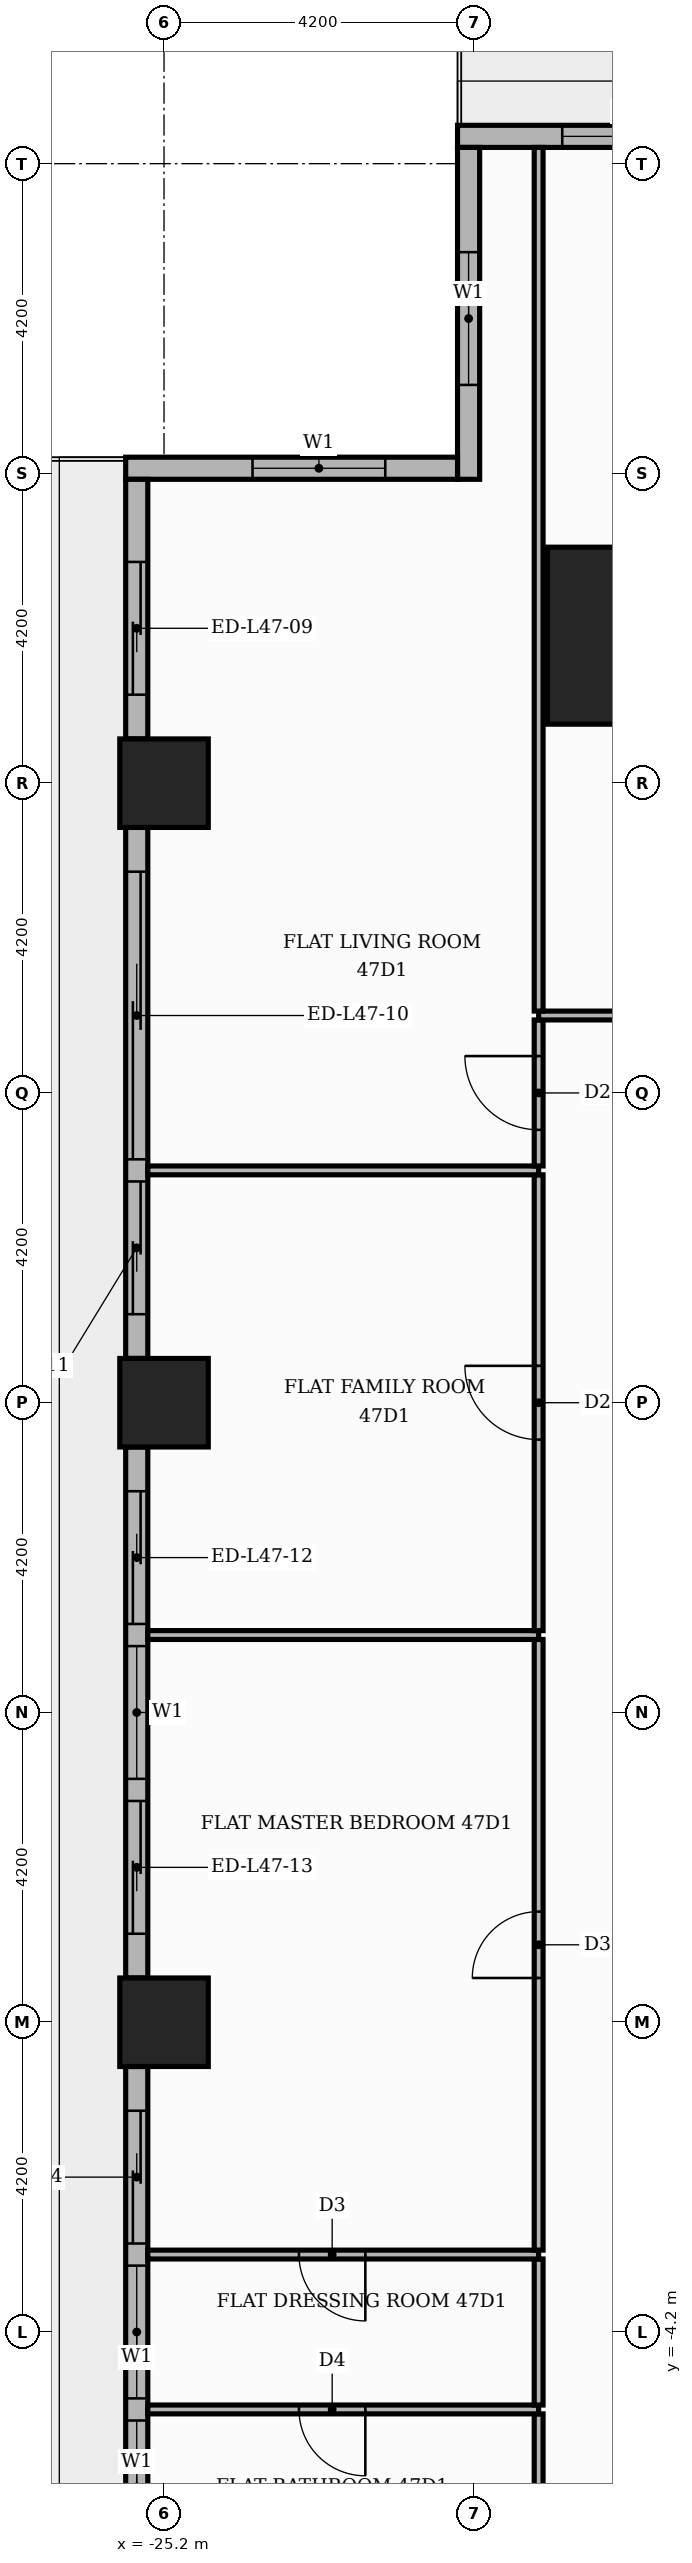
"""IFC4 building model, lengths in metres.
Left out: names, types, materials, properties, quantities, classifications, styles, units other than length and angle.
Written with IfcOpenShell. Run it as: python <this file> out.ifc"""

import sys

from ifc_helpers import new_model, si_unit, direction, frame, frame_2d, origin, origin_2d, place, context, subcontext, project, spatial, rectangle, extrude, element, fill, save


model = new_model("IFC4")
c1 = context("Model", 3, precision=1e-05, world=origin(), true_north=direction((0.0, 1.0)))
c2 = subcontext(c1, "Body", "Model", "MODEL_VIEW")
j1 = project(units=[si_unit("LENGTHUNIT", "METRE"), si_unit("PLANEANGLEUNIT", "RADIAN")], contexts=[c1])
p1 = place(None, origin())
s1 = spatial("IfcSite", under=j1, at=p1, CompositionType="ELEMENT")
p2 = place(p1, origin())
s2 = spatial("IfcBuilding", under=s1, at=p2, CompositionType="ELEMENT")
p3 = place(p2, frame((0.0, 0.0, 200.1)))
s3 = spatial("IfcBuildingStorey", under=s2, at=p3, CompositionType="ELEMENT", Elevation=200.1)
p4 = place(p3, frame((-18.8, 18.8, 0.0), z_axis=(0.0, 0.0, 1.0), x_axis=(1.0, 0.0, 0.0)))
e1 = element("IfcColumn", 1, at=p4, inside=s3, PredefinedType="COLUMN", context=c2, shape_type="SweptSolid", body=[
    extrude(rectangle(XDim=2.4, YDim=2.4, at=origin_2d()), origin(), (0.0, 0.0, 1.0), 3.9),
])
for number, where, z_axis, x_axis in (
    (2, (-25.2, 0.0, 0.0), (0.0, 0.0, 1.0), (1.0, 0.0, 0.0)),
    (3, (-25.2, 8.4, 0.0), (0.0, 0.0, 1.0), (1.0, 0.0, 0.0)),
    (4, (-25.2, 16.8, 0.0), (0.0, 0.0, 1.0), (1.0, 0.0, 0.0)),
):
    element("IfcColumn", number, at=place(p3, frame(where, z_axis=z_axis, x_axis=x_axis)), inside=s3, PredefinedType="COLUMN", context=c2, shape_type="SweptSolid", body=[
        extrude(rectangle(XDim=1.2, YDim=1.2, at=origin_2d()), origin(), (0.0, 0.0, 1.0), 3.9),
    ])
p5 = place(p3, frame((-17.4, 25.57, 0.0), z_axis=(0.0, 0.0, 1.0), x_axis=(-1.0, 0.0, 0.0)))
e5 = element("IfcWall", 5, at=p5, inside=s3, PredefinedType="STANDARD", context=c2, shape_type="SweptSolid", body=[
    extrude(rectangle(XDim=3.82, YDim=0.3, at=frame_2d((1.91, 0.0))), origin(), (0.0, 0.0, 1.0), 3.48),
])
p6 = place(p5, frame((0.6, 0.0, 0.9)))
e6 = element("IfcOpeningElement", 6, at=p6, cuts=e5, PredefinedType="OPENING", context=c2, shape_type="SweptSolid", body=[
    extrude(rectangle(XDim=1.8, YDim=2.1, at=frame_2d((0.9, 1.05))), frame((0.0, 0.16, 0.0), z_axis=(0.0, -1.0, 0.0), x_axis=(1.0, 0.0, 0.0)), (0.0, 0.0, 1.0), 0.32),
])
p7 = place(p3, frame((-21.07, 25.42, 0.0), z_axis=(0.0, 0.0, 1.0), x_axis=(0.0, -1.0, 0.0)))
e7 = element("IfcWall", 7, at=p7, inside=s3, PredefinedType="STANDARD", context=c2, shape_type="SweptSolid", body=[
    extrude(rectangle(XDim=4.5, YDim=0.3, at=frame_2d((2.25, 0.0))), origin(), (0.0, 0.0, 1.0), 3.48),
])
p8 = place(p7, frame((1.42, 0.0, 0.9)))
e8 = element("IfcOpeningElement", 8, at=p8, cuts=e7, PredefinedType="OPENING", context=c2, shape_type="SweptSolid", body=[
    extrude(rectangle(XDim=1.8, YDim=2.1, at=frame_2d((0.9, 1.05))), frame((0.0, 0.16, 0.0), z_axis=(0.0, -1.0, 0.0), x_axis=(1.0, 0.0, 0.0)), (0.0, 0.0, 1.0), 0.32),
])
p9 = place(p3, frame((-21.22, 21.07, 0.0), z_axis=(0.0, 0.0, 1.0), x_axis=(-1.0, 0.0, 0.0)))
e9 = element("IfcWall", 9, at=p9, inside=s3, PredefinedType="STANDARD", context=c2, shape_type="SweptSolid", body=[
    extrude(rectangle(XDim=4.5, YDim=0.3, at=frame_2d((2.25, 0.0))), origin(), (0.0, 0.0, 1.0), 3.48),
])
p10 = place(p9, frame((0.98, 0.0, 0.9)))
e10 = element("IfcOpeningElement", 10, at=p10, cuts=e9, PredefinedType="OPENING", context=c2, shape_type="SweptSolid", body=[
    extrude(rectangle(XDim=1.8, YDim=2.1, at=frame_2d((0.9, 1.05))), frame((0.0, 0.16, 0.0), z_axis=(0.0, -1.0, 0.0), x_axis=(1.0, 0.0, 0.0)), (0.0, 0.0, 1.0), 0.32),
])
p11 = place(p3, frame((-25.57, 20.92, 0.0), z_axis=(0.0, 0.0, 1.0), x_axis=(0.0, -1.0, 0.0)))
e11 = element("IfcWall", 11, at=p11, inside=s3, PredefinedType="STANDARD", context=c2, shape_type="SweptSolid", body=[
    extrude(rectangle(XDim=3.52, YDim=0.3, at=frame_2d((1.76, 0.0))), origin(), (0.0, 0.0, 1.0), 3.48),
])
p12 = place(p11, frame((1.12, 0.0, 0.0)))
e12 = element("IfcOpeningElement", 12, at=p12, cuts=e11, PredefinedType="OPENING", context=c2, shape_type="SweptSolid", body=[
    extrude(rectangle(XDim=1.8, YDim=2.4, at=frame_2d((0.9, 1.2))), frame((0.0, 0.16, 0.0), z_axis=(0.0, -1.0, 0.0), x_axis=(1.0, 0.0, 0.0)), (0.0, 0.0, 1.0), 0.32),
])
p13 = place(p3, frame((-25.57, 16.2, 0.0), z_axis=(0.0, 0.0, 1.0), x_axis=(0.0, -1.0, 0.0)))
e13 = element("IfcWall", 13, at=p13, inside=s3, PredefinedType="STANDARD", context=c2, shape_type="SweptSolid", body=[
    extrude(rectangle(XDim=7.2, YDim=0.3, at=frame_2d((3.6, 0.0))), origin(), (0.0, 0.0, 1.0), 3.48),
])
p14 = place(p13, frame((0.6, 0.0, 0.0)))
e14 = element("IfcOpeningElement", 14, at=p14, cuts=e13, PredefinedType="OPENING", context=c2, shape_type="SweptSolid", body=[
    extrude(rectangle(XDim=3.9, YDim=2.4, at=frame_2d((1.95, 1.2))), frame((0.0, 0.16, 0.0), z_axis=(0.0, -1.0, 0.0), x_axis=(1.0, 0.0, 0.0)), (0.0, 0.0, 1.0), 0.32),
])
p15 = place(p13, frame((4.8, 0.0, 0.0)))
e15 = element("IfcOpeningElement", 15, at=p15, cuts=e13, PredefinedType="OPENING", context=c2, shape_type="SweptSolid", body=[
    extrude(rectangle(XDim=1.8, YDim=2.4, at=frame_2d((0.9, 1.2))), frame((0.0, 0.16, 0.0), z_axis=(0.0, -1.0, 0.0), x_axis=(1.0, 0.0, 0.0)), (0.0, 0.0, 1.0), 0.32),
])
p16 = place(p3, frame((-25.57, 7.8, 0.0), z_axis=(0.0, 0.0, 1.0), x_axis=(0.0, -1.0, 0.0)))
e16 = element("IfcWall", 16, at=p16, inside=s3, PredefinedType="STANDARD", context=c2, shape_type="SweptSolid", body=[
    extrude(rectangle(XDim=7.2, YDim=0.3, at=frame_2d((3.6, 0.0))), origin(), (0.0, 0.0, 1.0), 3.48),
])
p17 = place(p16, frame((0.6, 0.0, 0.0)))
e17 = element("IfcOpeningElement", 17, at=p17, cuts=e16, PredefinedType="OPENING", context=c2, shape_type="SweptSolid", body=[
    extrude(rectangle(XDim=1.8, YDim=2.4, at=frame_2d((0.9, 1.2))), frame((0.0, 0.16, 0.0), z_axis=(0.0, -1.0, 0.0), x_axis=(1.0, 0.0, 0.0)), (0.0, 0.0, 1.0), 0.32),
])
p18 = place(p16, frame((2.7, 0.0, 0.9)))
e18 = element("IfcOpeningElement", 18, at=p18, cuts=e16, PredefinedType="OPENING", context=c2, shape_type="SweptSolid", body=[
    extrude(rectangle(XDim=1.8, YDim=2.1, at=frame_2d((0.9, 1.05))), frame((0.0, 0.16, 0.0), z_axis=(0.0, -1.0, 0.0), x_axis=(1.0, 0.0, 0.0)), (0.0, 0.0, 1.0), 0.32),
])
p19 = place(p16, frame((4.8, 0.0, 0.0)))
e19 = element("IfcOpeningElement", 19, at=p19, cuts=e16, PredefinedType="OPENING", context=c2, shape_type="SweptSolid", body=[
    extrude(rectangle(XDim=1.8, YDim=2.4, at=frame_2d((0.9, 1.2))), frame((0.0, 0.16, 0.0), z_axis=(0.0, -1.0, 0.0), x_axis=(1.0, 0.0, 0.0)), (0.0, 0.0, 1.0), 0.32),
])
p20 = place(p3, frame((-25.57, -0.6, 0.0), z_axis=(0.0, 0.0, 1.0), x_axis=(0.0, -1.0, 0.0)))
e20 = element("IfcWall", 20, at=p20, inside=s3, PredefinedType="STANDARD", context=c2, shape_type="SweptSolid", body=[
    extrude(rectangle(XDim=7.2, YDim=0.3, at=frame_2d((3.6, 0.0))), origin(), (0.0, 0.0, 1.0), 3.48),
])
p21 = place(p20, frame((0.6, 0.0, 0.0)))
e21 = element("IfcOpeningElement", 21, at=p21, cuts=e20, PredefinedType="OPENING", context=c2, shape_type="SweptSolid", body=[
    extrude(rectangle(XDim=1.8, YDim=2.4, at=frame_2d((0.9, 1.2))), frame((0.0, 0.16, 0.0), z_axis=(0.0, -1.0, 0.0), x_axis=(1.0, 0.0, 0.0)), (0.0, 0.0, 1.0), 0.32),
])
p22 = place(p20, frame((2.7, 0.0, 0.9)))
e22 = element("IfcOpeningElement", 22, at=p22, cuts=e20, PredefinedType="OPENING", context=c2, shape_type="SweptSolid", body=[
    extrude(rectangle(XDim=1.8, YDim=2.1, at=frame_2d((0.9, 1.05))), frame((0.0, 0.16, 0.0), z_axis=(0.0, -1.0, 0.0), x_axis=(1.0, 0.0, 0.0)), (0.0, 0.0, 1.0), 0.32),
])
p23 = place(p20, frame((4.8, 0.0, 0.9)))
e23 = element("IfcOpeningElement", 23, at=p23, cuts=e20, PredefinedType="OPENING", context=c2, shape_type="SweptSolid", body=[
    extrude(rectangle(XDim=1.8, YDim=2.1, at=frame_2d((0.9, 1.05))), frame((0.0, 0.16, 0.0), z_axis=(0.0, -1.0, 0.0), x_axis=(1.0, 0.0, 0.0)), (0.0, 0.0, 1.0), 0.32),
])
p24 = place(p3, frame((-20.12, -7.29, 0.0), z_axis=(0.0, 0.0, 1.0), x_axis=(0.0, 1.0, 0.0)))
e24 = element("IfcWall", 24, at=p24, inside=s3, PredefinedType="PARTITIONING", context=c2, shape_type="SweptSolid", body=[
    extrude(rectangle(XDim=1.98, YDim=0.12, at=frame_2d((0.99, 0.0))), origin(), (0.0, 0.0, 1.0), 3.48),
])
p25 = place(p3, frame((-25.42, -5.25, 0.0), z_axis=(0.0, 0.0, 1.0), x_axis=(1.0, 0.0, 0.0)))
e25 = element("IfcWall", 25, at=p25, inside=s3, PredefinedType="PARTITIONING", context=c2, shape_type="SweptSolid", body=[
    extrude(rectangle(XDim=5.3, YDim=0.12, at=frame_2d((2.65, 0.0))), origin(), (0.0, 0.0, 1.0), 3.48),
])
p26 = place(p25, frame((2.05, 0.0, 0.0)))
e26 = element("IfcOpeningElement", 26, at=p26, cuts=e25, PredefinedType="OPENING", context=c2, shape_type="SweptSolid", body=[
    extrude(rectangle(XDim=0.9, YDim=2.1, at=frame_2d((0.45, 1.05))), frame((0.0, 0.07, 0.0), z_axis=(0.0, -1.0, 0.0), x_axis=(1.0, 0.0, 0.0)), (0.0, 0.0, 1.0), 0.14),
])
p27 = place(p3, frame((-20.12, -5.19, 0.0), z_axis=(0.0, 0.0, 1.0), x_axis=(0.0, 1.0, 0.0)))
e27 = element("IfcWall", 27, at=p27, inside=s3, PredefinedType="PARTITIONING", context=c2, shape_type="SweptSolid", body=[
    extrude(rectangle(XDim=1.98, YDim=0.12, at=frame_2d((0.99, 0.0))), origin(), (0.0, 0.0, 1.0), 3.48),
])
p28 = place(p3, frame((-25.42, -3.15, 0.0), z_axis=(0.0, 0.0, 1.0), x_axis=(1.0, 0.0, 0.0)))
e28 = element("IfcWall", 28, at=p28, inside=s3, PredefinedType="PARTITIONING", context=c2, shape_type="SweptSolid", body=[
    extrude(rectangle(XDim=5.3, YDim=0.12, at=frame_2d((2.65, 0.0))), origin(), (0.0, 0.0, 1.0), 3.48),
])
p29 = place(p28, frame((2.05, 0.0, 0.0)))
e29 = element("IfcOpeningElement", 29, at=p29, cuts=e28, PredefinedType="OPENING", context=c2, shape_type="SweptSolid", body=[
    extrude(rectangle(XDim=0.9, YDim=2.1, at=frame_2d((0.45, 1.05))), frame((0.0, 0.07, 0.0), z_axis=(0.0, -1.0, 0.0), x_axis=(1.0, 0.0, 0.0)), (0.0, 0.0, 1.0), 0.14),
])
p30 = place(p3, frame((-20.12, -3.09, 0.0), z_axis=(0.0, 0.0, 1.0), x_axis=(0.0, 1.0, 0.0)))
e30 = element("IfcWall", 30, at=p30, inside=s3, PredefinedType="PARTITIONING", context=c2, shape_type="SweptSolid", body=[
    extrude(rectangle(XDim=8.28, YDim=0.12, at=frame_2d((4.14, 0.0))), origin(), (0.0, 0.0, 1.0), 3.48),
])
p31 = place(p30, frame((3.69, 0.0, 0.0)))
e31 = element("IfcOpeningElement", 31, at=p31, cuts=e30, PredefinedType="OPENING", context=c2, shape_type="SweptSolid", body=[
    extrude(rectangle(XDim=0.9, YDim=2.1, at=frame_2d((0.45, 1.05))), frame((0.0, 0.07, 0.0), z_axis=(0.0, -1.0, 0.0), x_axis=(1.0, 0.0, 0.0)), (0.0, 0.0, 1.0), 0.14),
])
p32 = place(p3, frame((-25.42, 5.25, 0.0), z_axis=(0.0, 0.0, 1.0), x_axis=(1.0, 0.0, 0.0)))
e32 = element("IfcWall", 32, at=p32, inside=s3, PredefinedType="PARTITIONING", context=c2, shape_type="SweptSolid", body=[
    extrude(rectangle(XDim=5.3, YDim=0.12, at=frame_2d((2.65, 0.0))), origin(), (0.0, 0.0, 1.0), 3.48),
])
p33 = place(p3, frame((-20.12, 5.31, 0.0), z_axis=(0.0, 0.0, 1.0), x_axis=(0.0, 1.0, 0.0)))
e33 = element("IfcWall", 33, at=p33, inside=s3, PredefinedType="PARTITIONING", context=c2, shape_type="SweptSolid", body=[
    extrude(rectangle(XDim=6.18, YDim=0.12, at=frame_2d((3.09, 0.0))), origin(), (0.0, 0.0, 1.0), 3.48),
])
p34 = place(p33, frame((2.59, 0.0, 0.0)))
e34 = element("IfcOpeningElement", 34, at=p34, cuts=e33, PredefinedType="OPENING", context=c2, shape_type="SweptSolid", body=[
    extrude(rectangle(XDim=1.0, YDim=2.1, at=frame_2d((0.5, 1.05))), frame((0.0, 0.07, 0.0), z_axis=(0.0, -1.0, 0.0), x_axis=(1.0, 0.0, 0.0)), (0.0, 0.0, 1.0), 0.14),
])
p35 = place(p3, frame((-25.42, 11.55, 0.0), z_axis=(0.0, 0.0, 1.0), x_axis=(1.0, 0.0, 0.0)))
e35 = element("IfcWall", 35, at=p35, inside=s3, PredefinedType="PARTITIONING", context=c2, shape_type="SweptSolid", body=[
    extrude(rectangle(XDim=5.3, YDim=0.12, at=frame_2d((2.65, 0.0))), origin(), (0.0, 0.0, 1.0), 3.48),
])
p36 = place(p3, frame((-20.12, 11.61, 0.0), z_axis=(0.0, 0.0, 1.0), x_axis=(0.0, 1.0, 0.0)))
e36 = element("IfcWall", 36, at=p36, inside=s3, PredefinedType="PARTITIONING", context=c2, shape_type="SweptSolid", body=[
    extrude(rectangle(XDim=1.98, YDim=0.12, at=frame_2d((0.99, 0.0))), origin(), (0.0, 0.0, 1.0), 3.48),
])
p37 = place(p36, frame((0.49, 0.0, 0.0)))
e37 = element("IfcOpeningElement", 37, at=p37, cuts=e36, PredefinedType="OPENING", context=c2, shape_type="SweptSolid", body=[
    extrude(rectangle(XDim=1.0, YDim=2.1, at=frame_2d((0.5, 1.05))), frame((0.0, 0.07, 0.0), z_axis=(0.0, -1.0, 0.0), x_axis=(1.0, 0.0, 0.0)), (0.0, 0.0, 1.0), 0.14),
])
p38 = place(p3, frame((-20.12, 13.65, 0.0), z_axis=(0.0, 0.0, 1.0), x_axis=(1.0, 0.0, 0.0)))
e38 = element("IfcWall", 38, at=p38, inside=s3, PredefinedType="PARTITIONING", context=c2, shape_type="SweptSolid", body=[
    extrude(rectangle(XDim=6.47, YDim=0.12, at=frame_2d((3.235, 0.0))), origin(), (0.0, 0.0, 1.0), 3.48),
])
p39 = place(p38, frame((2.785, 0.0, 0.0)))
e39 = element("IfcOpeningElement", 39, at=p39, cuts=e38, PredefinedType="OPENING", context=c2, shape_type="SweptSolid", body=[
    extrude(rectangle(XDim=0.9, YDim=2.1, at=frame_2d((0.45, 1.05))), frame((0.0, 0.07, 0.0), z_axis=(0.0, -1.0, 0.0), x_axis=(1.0, 0.0, 0.0)), (0.0, 0.0, 1.0), 0.14),
])
p40 = place(p3, frame((-20.12, 13.71, 0.0), z_axis=(0.0, 0.0, 1.0), x_axis=(0.0, 1.0, 0.0)))
e40 = element("IfcWall", 40, at=p40, inside=s3, PredefinedType="PARTITIONING", context=c2, shape_type="SweptSolid", body=[
    extrude(rectangle(XDim=11.71, YDim=0.12, at=frame_2d((5.855, 0.0))), origin(), (0.0, 0.0, 1.0), 3.48),
])
p41 = place(p6, origin())
e41 = element("IfcWindow", 41, at=p41, inside=s3, PartitioningType="SINGLE_PANEL", PredefinedType="WINDOW", context=c2, shape_type="SweptSolid", body=[
    extrude(rectangle(XDim=1.8, YDim=2.1, at=frame_2d((0.9, 1.05))), frame((0.0, 0.03, 0.0), z_axis=(0.0, -1.0, 0.0), x_axis=(1.0, 0.0, 0.0)), (0.0, 0.0, 1.0), 0.06),
])
fill(e6, e41)
p42 = place(p8, origin())
e42 = element("IfcWindow", 42, at=p42, inside=s3, PartitioningType="SINGLE_PANEL", PredefinedType="WINDOW", context=c2, shape_type="SweptSolid", body=[
    extrude(rectangle(XDim=1.8, YDim=2.1, at=frame_2d((0.9, 1.05))), frame((0.0, 0.03, 0.0), z_axis=(0.0, -1.0, 0.0), x_axis=(1.0, 0.0, 0.0)), (0.0, 0.0, 1.0), 0.06),
])
fill(e8, e42)
p43 = place(p10, origin())
e43 = element("IfcWindow", 43, at=p43, inside=s3, PartitioningType="SINGLE_PANEL", PredefinedType="WINDOW", context=c2, shape_type="SweptSolid", body=[
    extrude(rectangle(XDim=1.8, YDim=2.1, at=frame_2d((0.9, 1.05))), frame((0.0, 0.03, 0.0), z_axis=(0.0, -1.0, 0.0), x_axis=(1.0, 0.0, 0.0)), (0.0, 0.0, 1.0), 0.06),
])
fill(e10, e43)
p44 = place(p12, origin())
e44 = element("IfcDoor", 44, at=p44, inside=s3, OperationType="SLIDING_TO_RIGHT", PredefinedType="DOOR", context=c2, shape_type="SweptSolid", body=[
    extrude(rectangle(XDim=1.8, YDim=2.4, at=frame_2d((0.9, 1.2))), frame((0.0, 0.025, 0.0), z_axis=(0.0, -1.0, 0.0), x_axis=(1.0, 0.0, 0.0)), (0.0, 0.0, 1.0), 0.05),
])
fill(e12, e44)
p45 = place(p14, origin())
e45 = element("IfcDoor", 45, at=p45, inside=s3, OperationType="SLIDING_TO_LEFT", PredefinedType="DOOR", context=c2, shape_type="SweptSolid", body=[
    extrude(rectangle(XDim=3.9, YDim=2.4, at=frame_2d((1.95, 1.2))), frame((0.0, 0.025, 0.0), z_axis=(0.0, -1.0, 0.0), x_axis=(1.0, 0.0, 0.0)), (0.0, 0.0, 1.0), 0.05),
])
fill(e14, e45)
p46 = place(p15, origin())
e46 = element("IfcDoor", 46, at=p46, inside=s3, OperationType="SLIDING_TO_RIGHT", PredefinedType="DOOR", context=c2, shape_type="SweptSolid", body=[
    extrude(rectangle(XDim=1.8, YDim=2.4, at=frame_2d((0.9, 1.2))), frame((0.0, 0.025, 0.0), z_axis=(0.0, -1.0, 0.0), x_axis=(1.0, 0.0, 0.0)), (0.0, 0.0, 1.0), 0.05),
])
fill(e15, e46)
p47 = place(p17, origin())
e47 = element("IfcDoor", 47, at=p47, inside=s3, OperationType="SLIDING_TO_LEFT", PredefinedType="DOOR", context=c2, shape_type="SweptSolid", body=[
    extrude(rectangle(XDim=1.8, YDim=2.4, at=frame_2d((0.9, 1.2))), frame((0.0, 0.025, 0.0), z_axis=(0.0, -1.0, 0.0), x_axis=(1.0, 0.0, 0.0)), (0.0, 0.0, 1.0), 0.05),
])
fill(e17, e47)
p48 = place(p18, origin())
e48 = element("IfcWindow", 48, at=p48, inside=s3, PartitioningType="SINGLE_PANEL", PredefinedType="WINDOW", context=c2, shape_type="SweptSolid", body=[
    extrude(rectangle(XDim=1.8, YDim=2.1, at=frame_2d((0.9, 1.05))), frame((0.0, 0.03, 0.0), z_axis=(0.0, -1.0, 0.0), x_axis=(1.0, 0.0, 0.0)), (0.0, 0.0, 1.0), 0.06),
])
fill(e18, e48)
p49 = place(p19, origin())
e49 = element("IfcDoor", 49, at=p49, inside=s3, OperationType="SLIDING_TO_RIGHT", PredefinedType="DOOR", context=c2, shape_type="SweptSolid", body=[
    extrude(rectangle(XDim=1.8, YDim=2.4, at=frame_2d((0.9, 1.2))), frame((0.0, 0.025, 0.0), z_axis=(0.0, -1.0, 0.0), x_axis=(1.0, 0.0, 0.0)), (0.0, 0.0, 1.0), 0.05),
])
fill(e19, e49)
p50 = place(p21, origin())
e50 = element("IfcDoor", 50, at=p50, inside=s3, OperationType="SLIDING_TO_LEFT", PredefinedType="DOOR", context=c2, shape_type="SweptSolid", body=[
    extrude(rectangle(XDim=1.8, YDim=2.4, at=frame_2d((0.9, 1.2))), frame((0.0, 0.025, 0.0), z_axis=(0.0, -1.0, 0.0), x_axis=(1.0, 0.0, 0.0)), (0.0, 0.0, 1.0), 0.05),
])
fill(e21, e50)
p51 = place(p22, origin())
e51 = element("IfcWindow", 51, at=p51, inside=s3, PartitioningType="SINGLE_PANEL", PredefinedType="WINDOW", context=c2, shape_type="SweptSolid", body=[
    extrude(rectangle(XDim=1.8, YDim=2.1, at=frame_2d((0.9, 1.05))), frame((0.0, 0.03, 0.0), z_axis=(0.0, -1.0, 0.0), x_axis=(1.0, 0.0, 0.0)), (0.0, 0.0, 1.0), 0.06),
])
fill(e22, e51)
p52 = place(p23, origin())
e52 = element("IfcWindow", 52, at=p52, inside=s3, PartitioningType="SINGLE_PANEL", PredefinedType="WINDOW", context=c2, shape_type="SweptSolid", body=[
    extrude(rectangle(XDim=1.8, YDim=2.1, at=frame_2d((0.9, 1.05))), frame((0.0, 0.03, 0.0), z_axis=(0.0, -1.0, 0.0), x_axis=(1.0, 0.0, 0.0)), (0.0, 0.0, 1.0), 0.06),
])
fill(e23, e52)
p53 = place(p37, origin())
e53 = element("IfcDoor", 53, at=p53, inside=s3, OperationType="SINGLE_SWING_RIGHT", PredefinedType="DOOR", context=c2, shape_type="SweptSolid", body=[
    extrude(rectangle(XDim=1.0, YDim=2.1, at=frame_2d((0.5, 1.05))), frame((0.0, 0.025, 0.0), z_axis=(0.0, -1.0, 0.0), x_axis=(1.0, 0.0, 0.0)), (0.0, 0.0, 1.0), 0.05),
])
fill(e37, e53)
p54 = place(p34, origin())
e54 = element("IfcDoor", 54, at=p54, inside=s3, OperationType="SINGLE_SWING_RIGHT", PredefinedType="DOOR", context=c2, shape_type="SweptSolid", body=[
    extrude(rectangle(XDim=1.0, YDim=2.1, at=frame_2d((0.5, 1.05))), frame((0.0, 0.025, 0.0), z_axis=(0.0, -1.0, 0.0), x_axis=(1.0, 0.0, 0.0)), (0.0, 0.0, 1.0), 0.05),
])
fill(e34, e54)
p55 = place(p31, origin())
e55 = element("IfcDoor", 55, at=p55, inside=s3, OperationType="SINGLE_SWING_LEFT", PredefinedType="DOOR", context=c2, shape_type="SweptSolid", body=[
    extrude(rectangle(XDim=0.9, YDim=2.1, at=frame_2d((0.45, 1.05))), frame((0.0, 0.025, 0.0), z_axis=(0.0, -1.0, 0.0), x_axis=(1.0, 0.0, 0.0)), (0.0, 0.0, 1.0), 0.05),
])
fill(e31, e55)
p56 = place(p29, frame((0.9, 0.0, 0.0), z_axis=(0.0, 0.0, 1.0), x_axis=(-1.0, 0.0, 0.0)))
e56 = element("IfcDoor", 56, at=p56, inside=s3, OperationType="SINGLE_SWING_RIGHT", PredefinedType="DOOR", context=c2, shape_type="SweptSolid", body=[
    extrude(rectangle(XDim=0.9, YDim=2.1, at=frame_2d((0.45, 1.05))), frame((0.0, 0.025, 0.0), z_axis=(0.0, -1.0, 0.0), x_axis=(1.0, 0.0, 0.0)), (0.0, 0.0, 1.0), 0.05),
])
fill(e29, e56)
p57 = place(p26, frame((0.9, 0.0, 0.0), z_axis=(0.0, 0.0, 1.0), x_axis=(-1.0, 0.0, 0.0)))
e57 = element("IfcDoor", 57, at=p57, inside=s3, OperationType="SINGLE_SWING_RIGHT", PredefinedType="DOOR", context=c2, shape_type="SweptSolid", body=[
    extrude(rectangle(XDim=0.9, YDim=2.1, at=frame_2d((0.45, 1.05))), frame((0.0, 0.025, 0.0), z_axis=(0.0, -1.0, 0.0), x_axis=(1.0, 0.0, 0.0)), (0.0, 0.0, 1.0), 0.05),
])
fill(e26, e57)
save(model, sys.argv[1])
